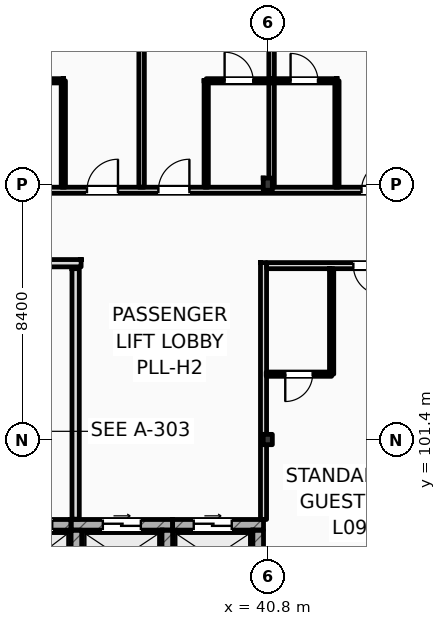
"""IFC4 building model, lengths in metres.
Left out: names, types, materials, properties, quantities, classifications, styles, units other than length and angle.
Written with IfcOpenShell. Run it as: python <this file> out.ifc"""

import sys

from ifc_helpers import new_model, si_unit, direction, frame, frame_2d, origin, origin_2d, place, context, subcontext, project, spatial, rectangle, i_section, extrude, element, fill, save


model = new_model("IFC4")
c1 = context("Model", 3, precision=1e-05, world=origin(), true_north=direction((0.0, 1.0)))
c2 = subcontext(c1, "Body", "Model", "MODEL_VIEW")
j1 = project(units=[si_unit("LENGTHUNIT", "METRE"), si_unit("PLANEANGLEUNIT", "RADIAN")], contexts=[c1])
p1 = place(None, origin())
s1 = spatial("IfcSite", under=j1, at=p1, CompositionType="ELEMENT")
p2 = place(p1, origin())
s2 = spatial("IfcBuilding", under=s1, at=p2, CompositionType="ELEMENT")
p3 = place(p2, frame((0.0, 0.0, 39.0)))
s3 = spatial("IfcBuildingStorey", under=s2, at=p3, CompositionType="ELEMENT", Elevation=39.0)
p4 = place(p3, frame((40.8, 101.4, 0.0), z_axis=(0.0, 0.0, 1.0), x_axis=(1.0, 0.0, 0.0)))
e1 = element("IfcColumn", 1, at=p4, inside=s3, PredefinedType="COLUMN", context=c2, shape_type="SweptSolid", body=[
    extrude(i_section(OverallWidth=0.3, OverallDepth=0.34, WebThickness=0.012, FlangeThickness=0.021, FilletRadius=0.027, at=origin_2d()), origin(), (0.0, 0.0, 1.0), 3.6),
])
p5 = place(p3, frame((40.8, 109.8, 0.0), z_axis=(0.0, 0.0, 1.0), x_axis=(1.0, 0.0, 0.0)))
e2 = element("IfcColumn", 2, at=p5, inside=s3, PredefinedType="COLUMN", context=c2, shape_type="SweptSolid", body=[
    extrude(i_section(OverallWidth=0.3, OverallDepth=0.4, WebThickness=0.013, FlangeThickness=0.024, FilletRadius=0.027, at=origin_2d()), origin(), (0.0, 0.0, 1.0), 3.6),
])
p6 = place(p3, frame((31.64, 98.595, 0.0), z_axis=(0.0, 0.0, 1.0), x_axis=(1.0, 0.0, 0.0)))
e3 = element("IfcWall", 3, at=p6, inside=s3, PredefinedType="SHEAR", context=c2, shape_type="SweptSolid", body=[
    extrude(rectangle(XDim=2.69, YDim=0.35, at=frame_2d((1.345, 0.0))), origin(), (0.0, 0.0, 1.0), 3.38),
])
p7 = place(p6, frame((0.97, 0.0, 0.0)))
e4 = element("IfcOpeningElement", 4, at=p7, cuts=e3, PredefinedType="OPENING", context=c2, shape_type="SweptSolid", body=[
    extrude(rectangle(XDim=1.1, YDim=2.2, at=frame_2d((0.55, 1.1))), frame((0.0, 0.185, 0.0), z_axis=(0.0, -1.0, 0.0), x_axis=(1.0, 0.0, 0.0)), (0.0, 0.0, 1.0), 0.37),
])
p8 = place(p3, frame((34.33, 98.595, 0.0), z_axis=(0.0, 0.0, 1.0), x_axis=(1.0, 0.0, 0.0)))
e5 = element("IfcWall", 5, at=p8, inside=s3, PredefinedType="SHEAR", context=c2, shape_type="SweptSolid", body=[
    extrude(rectangle(XDim=3.34, YDim=0.35, at=frame_2d((1.67, 0.0))), origin(), (0.0, 0.0, 1.0), 3.38),
])
p9 = place(p8, frame((1.045, 0.0, 0.0)))
e6 = element("IfcOpeningElement", 6, at=p9, cuts=e5, PredefinedType="OPENING", context=c2, shape_type="SweptSolid", body=[
    extrude(rectangle(XDim=1.25, YDim=2.25, at=frame_2d((0.625, 1.125))), frame((0.0, 0.185, 0.0), z_axis=(0.0, -1.0, 0.0), x_axis=(1.0, 0.0, 0.0)), (0.0, 0.0, 1.0), 0.37),
])
for number, where, z_axis, x_axis in (
    (7, (34.505, 96.58, 0.0), (0.0, 0.0, 1.0), (0.0, 1.0, 0.0)),
    (8, (37.495, 96.58, 0.0), (0.0, 0.0, 1.0), (0.0, 1.0, 0.0)),
):
    element("IfcWall", number, at=place(p3, frame(where, z_axis=z_axis, x_axis=x_axis)), inside=s3, PredefinedType="SHEAR", context=c2, shape_type="SweptSolid", body=[
        extrude(rectangle(XDim=1.84, YDim=0.35, at=frame_2d((0.92, 0.0))), origin(), (0.0, 0.0, 1.0), 3.38),
    ])
p10 = place(p3, frame((37.67, 98.595, 0.0), z_axis=(0.0, 0.0, 1.0), x_axis=(1.0, 0.0, 0.0)))
e9 = element("IfcWall", 9, at=p10, inside=s3, PredefinedType="SHEAR", context=c2, shape_type="SweptSolid", body=[
    extrude(rectangle(XDim=2.99, YDim=0.35, at=frame_2d((1.495, 0.0))), origin(), (0.0, 0.0, 1.0), 3.38),
])
p11 = place(p10, frame((0.695, 0.0, 0.0)))
e10 = element("IfcOpeningElement", 10, at=p11, cuts=e9, PredefinedType="OPENING", context=c2, shape_type="SweptSolid", body=[
    extrude(rectangle(XDim=1.25, YDim=2.25, at=frame_2d((0.625, 1.125))), frame((0.0, 0.185, 0.0), z_axis=(0.0, -1.0, 0.0), x_axis=(1.0, 0.0, 0.0)), (0.0, 0.0, 1.0), 0.37),
])
p12 = place(p3, frame((40.485, 96.58, 0.0), z_axis=(0.0, 0.0, 1.0), x_axis=(0.0, 1.0, 0.0)))
e11 = element("IfcWall", 11, at=p12, inside=s3, PredefinedType="SHEAR", context=c2, shape_type="SweptSolid", body=[
    extrude(rectangle(XDim=1.84, YDim=0.35, at=frame_2d((0.92, 0.0))), origin(), (0.0, 0.0, 1.0), 3.01),
])
p13 = place(p3, frame((34.48, 98.78, 0.0), z_axis=(0.0, 0.0, 1.0), x_axis=(0.0, 1.0, 0.0)))
e12 = element("IfcWall", 12, at=p13, inside=s3, PredefinedType="STANDARD", context=c2, shape_type="SweptSolid", body=[
    extrude(rectangle(XDim=8.24, YDim=0.24, at=frame_2d((4.12, 0.0))), origin(), (0.0, 0.0, 1.0), 3.38),
])
p14 = place(p3, frame((30.56, 107.2, 0.0), z_axis=(0.0, 0.0, 1.0), x_axis=(1.0, 0.0, 0.0)))
e13 = element("IfcWall", 13, at=p14, inside=s3, PredefinedType="STANDARD", context=c2, shape_type="SweptSolid", body=[
    extrude(rectangle(XDim=4.1, YDim=0.24, at=frame_2d((2.05, 0.0))), origin(), (0.0, 0.0, 1.0), 3.38),
])
p15 = place(p14, frame((1.3, 0.0, 0.0)))
e14 = element("IfcOpeningElement", 14, at=p15, cuts=e13, PredefinedType="OPENING", context=c2, shape_type="SweptSolid", body=[
    extrude(rectangle(XDim=1.1, YDim=2.2, at=frame_2d((0.55, 1.1))), frame((0.0, 0.13, 0.0), z_axis=(0.0, -1.0, 0.0), x_axis=(1.0, 0.0, 0.0)), (0.0, 0.0, 1.0), 0.26),
])
p16 = place(p3, frame((10.65, 109.6, 0.0), z_axis=(0.0, 0.0, 1.0), x_axis=(1.0, 0.0, 0.0)))
e15 = element("IfcWall", 15, at=p16, inside=s3, PredefinedType="PARTITIONING", context=c2, shape_type="SweptSolid", body=[
    extrude(rectangle(XDim=84.61, YDim=0.2, at=frame_2d((42.305, 0.0))), origin(), (0.0, 0.0, 1.0), 2.82),
])
p17 = place(p16, frame((15.49, 0.0, 0.0)))
e16 = element("IfcOpeningElement", 16, at=p17, cuts=e15, PredefinedType="OPENING", context=c2, shape_type="SweptSolid", body=[
    extrude(rectangle(XDim=1.02, YDim=2.2, at=frame_2d((0.51, 1.1))), frame((0.0, 0.11, 0.0), z_axis=(0.0, -1.0, 0.0), x_axis=(1.0, 0.0, 0.0)), (0.0, 0.0, 1.0), 0.22),
])
p18 = place(p16, frame((19.703, 0.0, 0.0)))
e17 = element("IfcOpeningElement", 17, at=p18, cuts=e15, PredefinedType="OPENING", context=c2, shape_type="SweptSolid", body=[
    extrude(rectangle(XDim=1.02, YDim=2.2, at=frame_2d((0.51, 1.1))), frame((0.0, 0.11, 0.0), z_axis=(0.0, -1.0, 0.0), x_axis=(1.0, 0.0, 0.0)), (0.0, 0.0, 1.0), 0.22),
])
p19 = place(p16, frame((24.203, 0.0, 0.0)))
e18 = element("IfcOpeningElement", 18, at=p19, cuts=e15, PredefinedType="OPENING", context=c2, shape_type="SweptSolid", body=[
    extrude(rectangle(XDim=1.02, YDim=2.2, at=frame_2d((0.51, 1.1))), frame((0.0, 0.11, 0.0), z_axis=(0.0, -1.0, 0.0), x_axis=(1.0, 0.0, 0.0)), (0.0, 0.0, 1.0), 0.22),
])
p20 = place(p16, frame((26.552, 0.0, 0.0)))
e19 = element("IfcOpeningElement", 19, at=p20, cuts=e15, PredefinedType="OPENING", context=c2, shape_type="SweptSolid", body=[
    extrude(rectangle(XDim=1.02, YDim=2.2, at=frame_2d((0.51, 1.1))), frame((0.0, 0.11, 0.0), z_axis=(0.0, -1.0, 0.0), x_axis=(1.0, 0.0, 0.0)), (0.0, 0.0, 1.0), 0.22),
])
p21 = place(p16, frame((33.233, 0.0, 0.0)))
e20 = element("IfcOpeningElement", 20, at=p21, cuts=e15, PredefinedType="OPENING", context=c2, shape_type="SweptSolid", body=[
    extrude(rectangle(XDim=0.96, YDim=2.2, at=frame_2d((0.48, 1.1))), frame((0.0, 0.11, 0.0), z_axis=(0.0, -1.0, 0.0), x_axis=(1.0, 0.0, 0.0)), (0.0, 0.0, 1.0), 0.22),
])
p22 = place(p16, frame((35.583, 0.0, 0.0)))
e21 = element("IfcOpeningElement", 21, at=p22, cuts=e15, PredefinedType="OPENING", context=c2, shape_type="SweptSolid", body=[
    extrude(rectangle(XDim=0.96, YDim=2.2, at=frame_2d((0.48, 1.1))), frame((0.0, 0.11, 0.0), z_axis=(0.0, -1.0, 0.0), x_axis=(1.0, 0.0, 0.0)), (0.0, 0.0, 1.0), 0.22),
])
p23 = place(p16, frame((42.233, 0.0, 0.0)))
e22 = element("IfcOpeningElement", 22, at=p23, cuts=e15, PredefinedType="OPENING", context=c2, shape_type="SweptSolid", body=[
    extrude(rectangle(XDim=0.96, YDim=2.2, at=frame_2d((0.48, 1.1))), frame((0.0, 0.11, 0.0), z_axis=(0.0, -1.0, 0.0), x_axis=(1.0, 0.0, 0.0)), (0.0, 0.0, 1.0), 0.22),
])
p24 = place(p16, frame((46.983, 0.0, 0.0)))
e23 = element("IfcOpeningElement", 23, at=p24, cuts=e15, PredefinedType="OPENING", context=c2, shape_type="SweptSolid", body=[
    extrude(rectangle(XDim=0.96, YDim=2.2, at=frame_2d((0.48, 1.1))), frame((0.0, 0.11, 0.0), z_axis=(0.0, -1.0, 0.0), x_axis=(1.0, 0.0, 0.0)), (0.0, 0.0, 1.0), 0.22),
])
p25 = place(p16, frame((51.233, 0.0, 0.0)))
e24 = element("IfcOpeningElement", 24, at=p25, cuts=e15, PredefinedType="OPENING", context=c2, shape_type="SweptSolid", body=[
    extrude(rectangle(XDim=0.96, YDim=2.2, at=frame_2d((0.48, 1.1))), frame((0.0, 0.11, 0.0), z_axis=(0.0, -1.0, 0.0), x_axis=(1.0, 0.0, 0.0)), (0.0, 0.0, 1.0), 0.22),
])
p26 = place(p16, frame((55.733, 0.0, 0.0)))
e25 = element("IfcOpeningElement", 25, at=p26, cuts=e15, PredefinedType="OPENING", context=c2, shape_type="SweptSolid", body=[
    extrude(rectangle(XDim=0.96, YDim=2.2, at=frame_2d((0.48, 1.1))), frame((0.0, 0.11, 0.0), z_axis=(0.0, -1.0, 0.0), x_axis=(1.0, 0.0, 0.0)), (0.0, 0.0, 1.0), 0.22),
])
p27 = place(p16, frame((58.083, 0.0, 0.0)))
e26 = element("IfcOpeningElement", 26, at=p27, cuts=e15, PredefinedType="OPENING", context=c2, shape_type="SweptSolid", body=[
    extrude(rectangle(XDim=0.96, YDim=2.2, at=frame_2d((0.48, 1.1))), frame((0.0, 0.11, 0.0), z_axis=(0.0, -1.0, 0.0), x_axis=(1.0, 0.0, 0.0)), (0.0, 0.0, 1.0), 0.22),
])
p28 = place(p16, frame((64.732, 0.0, 0.0)))
e27 = element("IfcOpeningElement", 27, at=p28, cuts=e15, PredefinedType="OPENING", context=c2, shape_type="SweptSolid", body=[
    extrude(rectangle(XDim=0.96, YDim=2.2, at=frame_2d((0.48, 1.1))), frame((0.0, 0.11, 0.0), z_axis=(0.0, -1.0, 0.0), x_axis=(1.0, 0.0, 0.0)), (0.0, 0.0, 1.0), 0.22),
])
p29 = place(p16, frame((66.832, 0.0, 0.0)))
e28 = element("IfcOpeningElement", 28, at=p29, cuts=e15, PredefinedType="OPENING", context=c2, shape_type="SweptSolid", body=[
    extrude(rectangle(XDim=0.96, YDim=2.2, at=frame_2d((0.48, 1.1))), frame((0.0, 0.11, 0.0), z_axis=(0.0, -1.0, 0.0), x_axis=(1.0, 0.0, 0.0)), (0.0, 0.0, 1.0), 0.22),
])
p30 = place(p16, frame((73.732, 0.0, 0.0)))
e29 = element("IfcOpeningElement", 29, at=p30, cuts=e15, PredefinedType="OPENING", context=c2, shape_type="SweptSolid", body=[
    extrude(rectangle(XDim=0.96, YDim=2.2, at=frame_2d((0.48, 1.1))), frame((0.0, 0.11, 0.0), z_axis=(0.0, -1.0, 0.0), x_axis=(1.0, 0.0, 0.0)), (0.0, 0.0, 1.0), 0.22),
])
p31 = place(p16, frame((78.233, 0.0, 0.0)))
e30 = element("IfcOpeningElement", 30, at=p31, cuts=e15, PredefinedType="OPENING", context=c2, shape_type="SweptSolid", body=[
    extrude(rectangle(XDim=0.96, YDim=2.2, at=frame_2d((0.48, 1.1))), frame((0.0, 0.11, 0.0), z_axis=(0.0, -1.0, 0.0), x_axis=(1.0, 0.0, 0.0)), (0.0, 0.0, 1.0), 0.22),
])
p32 = place(p16, frame((80.62, 0.0, 0.0)))
e31 = element("IfcOpeningElement", 31, at=p32, cuts=e15, PredefinedType="OPENING", context=c2, shape_type="SweptSolid", body=[
    extrude(rectangle(XDim=0.96, YDim=2.2, at=frame_2d((0.48, 1.1))), frame((0.0, 0.11, 0.0), z_axis=(0.0, -1.0, 0.0), x_axis=(1.0, 0.0, 0.0)), (0.0, 0.0, 1.0), 0.22),
])
p33 = place(p16, frame((2.716, 0.0, 0.0)))
e32 = element("IfcOpeningElement", 32, at=p33, cuts=e15, PredefinedType="OPENING", context=c2, shape_type="SweptSolid", body=[
    extrude(rectangle(XDim=1.35, YDim=2.25, at=frame_2d((0.675, 1.125))), frame((0.0, 0.11, 0.0), z_axis=(0.0, -1.0, 0.0), x_axis=(1.0, 0.0, 0.0)), (0.0, 0.0, 1.0), 0.22),
])
p34 = place(p16, frame((6.65, 0.0, 0.0)))
e33 = element("IfcOpeningElement", 33, at=p34, cuts=e15, PredefinedType="OPENING", context=c2, shape_type="SweptSolid", body=[
    extrude(rectangle(XDim=1.35, YDim=2.25, at=frame_2d((0.675, 1.125))), frame((0.0, 0.11, 0.0), z_axis=(0.0, -1.0, 0.0), x_axis=(1.0, 0.0, 0.0)), (0.0, 0.0, 1.0), 0.22),
])
p35 = place(p16, frame((10.583, 0.0, 0.0)))
e34 = element("IfcOpeningElement", 34, at=p35, cuts=e15, PredefinedType="OPENING", context=c2, shape_type="SweptSolid", body=[
    extrude(rectangle(XDim=1.35, YDim=2.25, at=frame_2d((0.675, 1.125))), frame((0.0, 0.11, 0.0), z_axis=(0.0, -1.0, 0.0), x_axis=(1.0, 0.0, 0.0)), (0.0, 0.0, 1.0), 0.22),
])
p36 = place(p3, frame((40.76, 107.12, 0.0), z_axis=(0.0, 0.0, 1.0), x_axis=(1.0, 0.0, 0.0)))
e35 = element("IfcWall", 35, at=p36, inside=s3, PredefinedType="PARTITIONING", context=c2, shape_type="SweptSolid", body=[
    extrude(rectangle(XDim=23.44, YDim=0.2, at=frame_2d((11.72, 0.0))), origin(), (0.0, 0.0, 1.0), 3.38),
])
p37 = place(p36, frame((2.855, 0.0, 0.0)))
e36 = element("IfcOpeningElement", 36, at=p37, cuts=e35, PredefinedType="OPENING", context=c2, shape_type="SweptSolid", body=[
    extrude(rectangle(XDim=0.96, YDim=2.2, at=frame_2d((0.48, 1.1))), frame((0.0, 0.11, 0.0), z_axis=(0.0, -1.0, 0.0), x_axis=(1.0, 0.0, 0.0)), (0.0, 0.0, 1.0), 0.22),
])
p38 = place(p36, frame((5.433, 0.0, 0.0)))
e37 = element("IfcOpeningElement", 37, at=p38, cuts=e35, PredefinedType="OPENING", context=c2, shape_type="SweptSolid", body=[
    extrude(rectangle(XDim=0.96, YDim=2.2, at=frame_2d((0.48, 1.1))), frame((0.0, 0.11, 0.0), z_axis=(0.0, -1.0, 0.0), x_axis=(1.0, 0.0, 0.0)), (0.0, 0.0, 1.0), 0.22),
])
p39 = place(p36, frame((12.273, 0.0, 0.0)))
e38 = element("IfcOpeningElement", 38, at=p39, cuts=e35, PredefinedType="OPENING", context=c2, shape_type="SweptSolid", body=[
    extrude(rectangle(XDim=0.96, YDim=2.2, at=frame_2d((0.48, 1.1))), frame((0.0, 0.11, 0.0), z_axis=(0.0, -1.0, 0.0), x_axis=(1.0, 0.0, 0.0)), (0.0, 0.0, 1.0), 0.22),
])
p40 = place(p36, frame((16.963, 0.0, 0.0)))
e39 = element("IfcOpeningElement", 39, at=p40, cuts=e35, PredefinedType="OPENING", context=c2, shape_type="SweptSolid", body=[
    extrude(rectangle(XDim=0.96, YDim=2.2, at=frame_2d((0.48, 1.1))), frame((0.0, 0.11, 0.0), z_axis=(0.0, -1.0, 0.0), x_axis=(1.0, 0.0, 0.0)), (0.0, 0.0, 1.0), 0.22),
])
p41 = place(p36, frame((19.578, 0.0, 0.0)))
e40 = element("IfcOpeningElement", 40, at=p41, cuts=e35, PredefinedType="OPENING", context=c2, shape_type="SweptSolid", body=[
    extrude(rectangle(XDim=0.96, YDim=2.2, at=frame_2d((0.48, 1.1))), frame((0.0, 0.11, 0.0), z_axis=(0.0, -1.0, 0.0), x_axis=(1.0, 0.0, 0.0)), (0.0, 0.0, 1.0), 0.22),
])
p42 = place(p3, frame((40.66, 98.77, 0.0), z_axis=(0.0, 0.0, 1.0), x_axis=(0.0, 1.0, 0.0)))
e41 = element("IfcWall", 41, at=p42, inside=s3, PredefinedType="PARTITIONING", context=c2, shape_type="SweptSolid", body=[
    extrude(rectangle(XDim=8.45, YDim=0.2, at=frame_2d((4.225, 0.0))), origin(), (0.0, 0.0, 1.0), 3.01),
])
p43 = place(p3, frame((36.65, 109.7, 0.0), z_axis=(0.0, 0.0, 1.0), x_axis=(0.0, 1.0, 0.0)))
e42 = element("IfcWall", 42, at=p43, inside=s3, PredefinedType="PARTITIONING", context=c2, shape_type="SweptSolid", body=[
    extrude(rectangle(XDim=8.15, YDim=0.18, at=frame_2d((4.075, 0.0))), origin(), (0.0, 0.0, 1.0), 3.38),
])
p44 = place(p3, frame((34.075, 109.7, 0.0), z_axis=(0.0, 0.0, 1.0), x_axis=(0.0, 1.0, 0.0)))
e43 = element("IfcWall", 43, at=p44, inside=s3, PredefinedType="PARTITIONING", context=c2, shape_type="SweptSolid", body=[
    extrude(rectangle(XDim=3.5, YDim=0.14, at=frame_2d((1.75, 0.0))), origin(), (0.0, 0.0, 1.0), 3.38),
])
p45 = place(p3, frame((31.925, 113.2, 0.0), z_axis=(0.0, 0.0, 1.0), x_axis=(1.0, 0.0, 0.0)))
e44 = element("IfcWall", 44, at=p45, inside=s3, PredefinedType="PARTITIONING", context=c2, shape_type="SweptSolid", body=[
    extrude(rectangle(XDim=2.15, YDim=0.14, at=frame_2d((1.075, 0.0))), origin(), (0.0, 0.0, 1.0), 3.38),
])
p46 = place(p45, frame((0.605, 0.0, 0.0)))
e45 = element("IfcOpeningElement", 45, at=p46, cuts=e44, PredefinedType="OPENING", context=c2, shape_type="SweptSolid", body=[
    extrude(rectangle(XDim=0.94, YDim=2.15, at=frame_2d((0.47, 1.075))), frame((0.0, 0.08, 0.0), z_axis=(0.0, -1.0, 0.0), x_axis=(1.0, 0.0, 0.0)), (0.0, 0.0, 1.0), 0.16),
])
p47 = place(p3, frame((40.925, 109.7, 0.0), z_axis=(0.0, 0.0, 1.0), x_axis=(0.0, 1.0, 0.0)))
e46 = element("IfcWall", 46, at=p47, inside=s3, PredefinedType="PARTITIONING", context=c2, shape_type="SweptSolid", body=[
    extrude(rectangle(XDim=8.15, YDim=0.18, at=frame_2d((4.075, 0.0))), origin(), (0.0, 0.0, 1.0), 3.01),
])
p48 = place(p3, frame((38.775, 109.7, 0.0), z_axis=(0.0, 0.0, 1.0), x_axis=(0.0, 1.0, 0.0)))
e47 = element("IfcWall", 47, at=p48, inside=s3, PredefinedType="PARTITIONING", context=c2, shape_type="SweptSolid", body=[
    extrude(rectangle(XDim=3.5, YDim=0.14, at=frame_2d((1.75, 0.0))), origin(), (0.0, 0.0, 1.0), 3.38),
])
p49 = place(p3, frame((38.775, 113.2, 0.0), z_axis=(0.0, 0.0, 1.0), x_axis=(1.0, 0.0, 0.0)))
e48 = element("IfcWall", 48, at=p49, inside=s3, PredefinedType="PARTITIONING", context=c2, shape_type="SweptSolid", body=[
    extrude(rectangle(XDim=2.15, YDim=0.14, at=frame_2d((1.075, 0.0))), origin(), (0.0, 0.0, 1.0), 3.38),
])
p50 = place(p49, frame((0.605, 0.0, 0.0)))
e49 = element("IfcOpeningElement", 49, at=p50, cuts=e48, PredefinedType="OPENING", context=c2, shape_type="SweptSolid", body=[
    extrude(rectangle(XDim=0.94, YDim=2.15, at=frame_2d((0.47, 1.075))), frame((0.0, 0.08, 0.0), z_axis=(0.0, -1.0, 0.0), x_axis=(1.0, 0.0, 0.0)), (0.0, 0.0, 1.0), 0.16),
])
p51 = place(p3, frame((43.075, 109.7, 0.0), z_axis=(0.0, 0.0, 1.0), x_axis=(0.0, 1.0, 0.0)))
e50 = element("IfcWall", 50, at=p51, inside=s3, PredefinedType="PARTITIONING", context=c2, shape_type="SweptSolid", body=[
    extrude(rectangle(XDim=3.5, YDim=0.14, at=frame_2d((1.75, 0.0))), origin(), (0.0, 0.0, 1.0), 3.38),
])
p52 = place(p3, frame((40.925, 113.2, 0.0), z_axis=(0.0, 0.0, 1.0), x_axis=(1.0, 0.0, 0.0)))
e51 = element("IfcWall", 51, at=p52, inside=s3, PredefinedType="PARTITIONING", context=c2, shape_type="SweptSolid", body=[
    extrude(rectangle(XDim=2.15, YDim=0.14, at=frame_2d((1.075, 0.0))), origin(), (0.0, 0.0, 1.0), 3.38),
])
p53 = place(p52, frame((0.625, 0.0, 0.0)))
e52 = element("IfcOpeningElement", 52, at=p53, cuts=e51, PredefinedType="OPENING", context=c2, shape_type="SweptSolid", body=[
    extrude(rectangle(XDim=0.9, YDim=2.1, at=frame_2d((0.45, 1.05))), frame((0.0, 0.08, 0.0), z_axis=(0.0, -1.0, 0.0), x_axis=(1.0, 0.0, 0.0)), (0.0, 0.0, 1.0), 0.16),
])
p54 = place(p3, frame((42.9, 103.55, 0.0), z_axis=(0.0, 0.0, 1.0), x_axis=(0.0, 1.0, 0.0)))
e53 = element("IfcWall", 53, at=p54, inside=s3, PredefinedType="PARTITIONING", context=c2, shape_type="SweptSolid", body=[
    extrude(rectangle(XDim=3.47, YDim=0.14, at=frame_2d((1.735, 0.0))), origin(), (0.0, 0.0, 1.0), 3.38),
])
p55 = place(p3, frame((40.75, 103.55, 0.0), z_axis=(0.0, 0.0, 1.0), x_axis=(1.0, 0.0, 0.0)))
e54 = element("IfcWall", 54, at=p55, inside=s3, PredefinedType="PARTITIONING", context=c2, shape_type="SweptSolid", body=[
    extrude(rectangle(XDim=2.15, YDim=0.14, at=frame_2d((1.075, 0.0))), origin(), (0.0, 0.0, 1.0), 3.38),
])
p56 = place(p55, frame((0.625, 0.0, 0.0)))
e55 = element("IfcOpeningElement", 55, at=p56, cuts=e54, PredefinedType="OPENING", context=c2, shape_type="SweptSolid", body=[
    extrude(rectangle(XDim=0.9, YDim=2.1, at=frame_2d((0.45, 1.05))), frame((0.0, 0.08, 0.0), z_axis=(0.0, -1.0, 0.0), x_axis=(1.0, 0.0, 0.0)), (0.0, 0.0, 1.0), 0.16),
])
p57 = place(p7, origin())
e56 = element("IfcDoor", 56, at=p57, inside=s3, OperationType="SLIDING_TO_LEFT", PredefinedType="DOOR", context=c2, shape_type="SweptSolid", body=[
    extrude(rectangle(XDim=1.1, YDim=2.2, at=frame_2d((0.55, 1.1))), frame((0.0, 0.025, 0.0), z_axis=(0.0, -1.0, 0.0), x_axis=(1.0, 0.0, 0.0)), (0.0, 0.0, 1.0), 0.05),
])
fill(e4, e56)
p58 = place(p9, origin())
e57 = element("IfcDoor", 57, at=p58, inside=s3, OperationType="SLIDING_TO_LEFT", PredefinedType="DOOR", context=c2, shape_type="SweptSolid", body=[
    extrude(rectangle(XDim=1.25, YDim=2.25, at=frame_2d((0.625, 1.125))), frame((0.0, 0.025, 0.0), z_axis=(0.0, -1.0, 0.0), x_axis=(1.0, 0.0, 0.0)), (0.0, 0.0, 1.0), 0.05),
])
fill(e6, e57)
p59 = place(p11, origin())
e58 = element("IfcDoor", 58, at=p59, inside=s3, OperationType="SLIDING_TO_LEFT", PredefinedType="DOOR", context=c2, shape_type="SweptSolid", body=[
    extrude(rectangle(XDim=1.25, YDim=2.25, at=frame_2d((0.625, 1.125))), frame((0.0, 0.025, 0.0), z_axis=(0.0, -1.0, 0.0), x_axis=(1.0, 0.0, 0.0)), (0.0, 0.0, 1.0), 0.05),
])
fill(e10, e58)
p60 = place(p19, origin())
e59 = element("IfcDoor", 59, at=p60, inside=s3, OperationType="SINGLE_SWING_RIGHT", PredefinedType="DOOR", context=c2, shape_type="SweptSolid", body=[
    extrude(rectangle(XDim=1.02, YDim=2.2, at=frame_2d((0.51, 1.1))), frame((0.0, 0.025, 0.0), z_axis=(0.0, -1.0, 0.0), x_axis=(1.0, 0.0, 0.0)), (0.0, 0.0, 1.0), 0.05),
])
fill(e18, e59)
p61 = place(p20, origin())
e60 = element("IfcDoor", 60, at=p61, inside=s3, OperationType="SINGLE_SWING_RIGHT", PredefinedType="DOOR", context=c2, shape_type="SweptSolid", body=[
    extrude(rectangle(XDim=1.02, YDim=2.2, at=frame_2d((0.51, 1.1))), frame((0.0, 0.025, 0.0), z_axis=(0.0, -1.0, 0.0), x_axis=(1.0, 0.0, 0.0)), (0.0, 0.0, 1.0), 0.05),
])
fill(e19, e60)
p62 = place(p50, origin())
e61 = element("IfcDoor", 61, at=p62, inside=s3, OperationType="SINGLE_SWING_LEFT", PredefinedType="DOOR", context=c2, shape_type="SweptSolid", body=[
    extrude(rectangle(XDim=0.94, YDim=2.15, at=frame_2d((0.47, 1.075))), frame((0.0, 0.025, 0.0), z_axis=(0.0, -1.0, 0.0), x_axis=(1.0, 0.0, 0.0)), (0.0, 0.0, 1.0), 0.05),
])
fill(e49, e61)
p63 = place(p21, origin())
e62 = element("IfcDoor", 62, at=p63, inside=s3, OperationType="SINGLE_SWING_RIGHT", PredefinedType="DOOR", context=c2, shape_type="SweptSolid", body=[
    extrude(rectangle(XDim=0.96, YDim=2.2, at=frame_2d((0.48, 1.1))), frame((0.0, 0.025, 0.0), z_axis=(0.0, -1.0, 0.0), x_axis=(1.0, 0.0, 0.0)), (0.0, 0.0, 1.0), 0.05),
])
fill(e20, e62)
p64 = place(p53, origin())
e63 = element("IfcDoor", 63, at=p64, inside=s3, OperationType="SINGLE_SWING_LEFT", PredefinedType="DOOR", context=c2, shape_type="SweptSolid", body=[
    extrude(rectangle(XDim=0.9, YDim=2.1, at=frame_2d((0.45, 1.05))), frame((0.0, 0.025, 0.0), z_axis=(0.0, -1.0, 0.0), x_axis=(1.0, 0.0, 0.0)), (0.0, 0.0, 1.0), 0.05),
])
fill(e52, e63)
p65 = place(p37, frame((0.96, 0.0, 0.0), z_axis=(0.0, 0.0, 1.0), x_axis=(-1.0, 0.0, 0.0)))
e64 = element("IfcDoor", 64, at=p65, inside=s3, OperationType="SINGLE_SWING_RIGHT", PredefinedType="DOOR", context=c2, shape_type="SweptSolid", body=[
    extrude(rectangle(XDim=0.96, YDim=2.2, at=frame_2d((0.48, 1.1))), frame((0.0, 0.025, 0.0), z_axis=(0.0, -1.0, 0.0), x_axis=(1.0, 0.0, 0.0)), (0.0, 0.0, 1.0), 0.05),
])
fill(e36, e64)
p66 = place(p56, frame((0.9, 0.0, 0.0), z_axis=(0.0, 0.0, 1.0), x_axis=(-1.0, 0.0, 0.0)))
e65 = element("IfcDoor", 65, at=p66, inside=s3, OperationType="SINGLE_SWING_LEFT", PredefinedType="DOOR", context=c2, shape_type="SweptSolid", body=[
    extrude(rectangle(XDim=0.9, YDim=2.1, at=frame_2d((0.45, 1.05))), frame((0.0, 0.025, 0.0), z_axis=(0.0, -1.0, 0.0), x_axis=(1.0, 0.0, 0.0)), (0.0, 0.0, 1.0), 0.05),
])
fill(e55, e65)
save(model, sys.argv[1])
